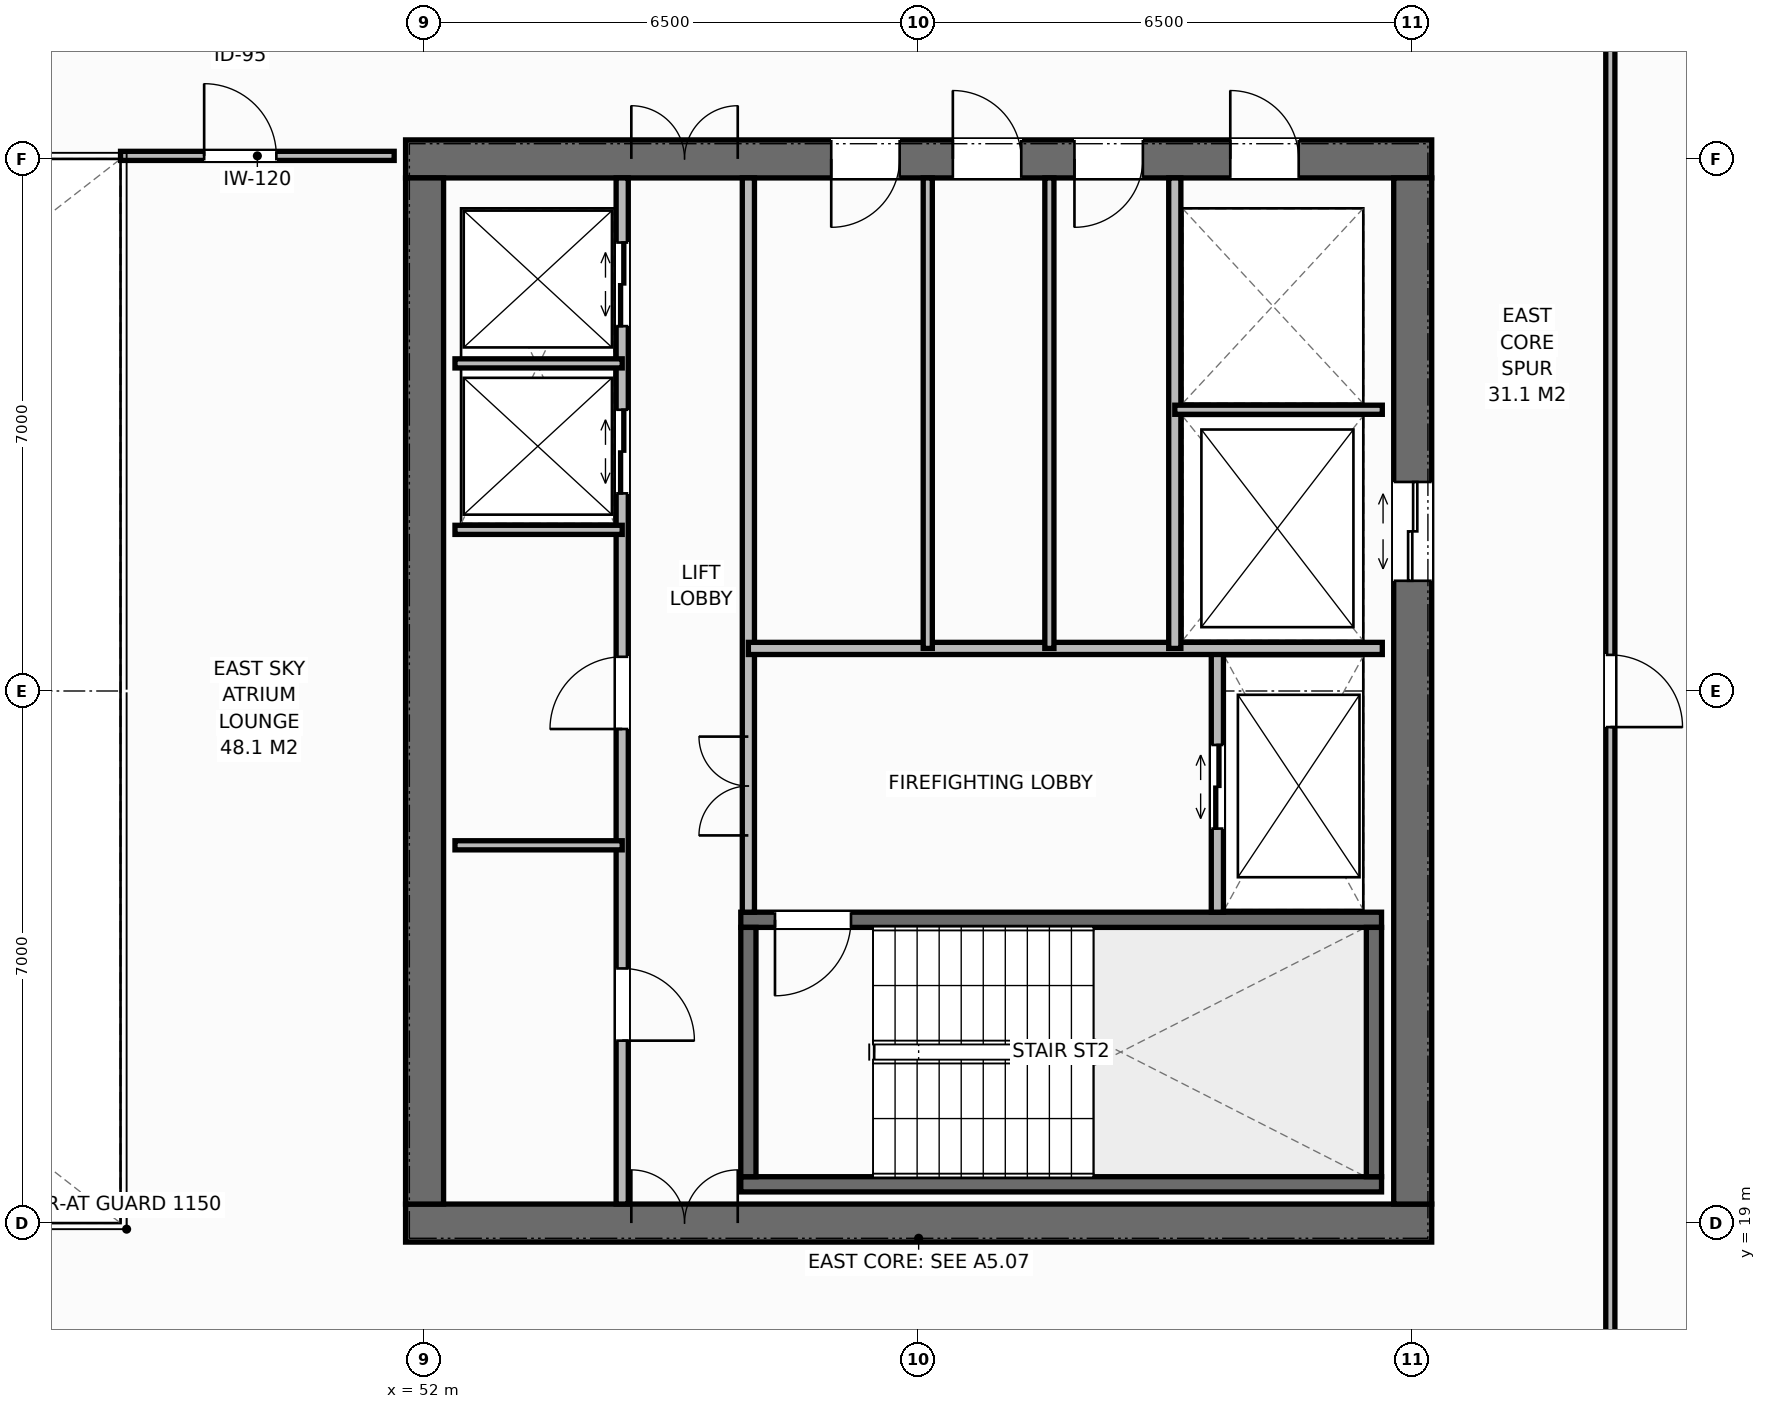
"""IFC4 building model, lengths in metres.
Left out: names, types, materials, properties, quantities, classifications, styles, units other than length and angle.
Written with IfcOpenShell. Run it as: python <this file> out.ifc"""

import sys

from ifc_helpers import new_model, si_unit, direction, frame, frame_2d, origin, place, context, subcontext, project, spatial, rectangle, extrude, element, fill, save


model = new_model("IFC4")
c1 = context("Model", 3, precision=1e-05, world=origin(), true_north=direction((0.0, 1.0)))
c2 = subcontext(c1, "Body", "Model", "MODEL_VIEW")
j1 = project(units=[si_unit("LENGTHUNIT", "METRE"), si_unit("PLANEANGLEUNIT", "RADIAN")], contexts=[c1])
p1 = place(None, origin())
s1 = spatial("IfcSite", under=j1, at=p1, CompositionType="ELEMENT")
p2 = place(p1, origin())
s2 = spatial("IfcBuilding", under=s1, at=p2, CompositionType="ELEMENT")
p3 = place(p2, frame((0.0, 0.0, 251.8)))
s3 = spatial("IfcBuildingStorey", under=s2, at=p3, CompositionType="ELEMENT", Elevation=251.8)
p4 = place(p3, frame((51.75, 19.0, 0.0), z_axis=(0.0, 0.0, 1.0), x_axis=(1.0, 0.0, 0.0)))
e1 = element("IfcWall", 1, at=p4, inside=s3, PredefinedType="SHEAR", context=c2, shape_type="SweptSolid", body=[
    extrude(rectangle(XDim=13.5, YDim=0.5, at=frame_2d((6.75, 0.0))), origin(), (0.0, 0.0, 1.0), 3.8),
])
p5 = place(p4, frame((2.97, 0.0, 0.0)))
e2 = element("IfcOpeningElement", 2, at=p5, cuts=e1, PredefinedType="OPENING", context=c2, shape_type="SweptSolid", body=[
    extrude(rectangle(XDim=1.4, YDim=2.2, at=frame_2d((0.7, 1.1))), frame((0.0, 0.26, 0.0), z_axis=(0.0, -1.0, 0.0), x_axis=(1.0, 0.0, 0.0)), (0.0, 0.0, 1.0), 0.52),
])
p6 = place(p3, frame((51.75, 33.0, 0.0), z_axis=(0.0, 0.0, 1.0), x_axis=(1.0, 0.0, 0.0)))
e3 = element("IfcWall", 3, at=p6, inside=s3, PredefinedType="SHEAR", context=c2, shape_type="SweptSolid", body=[
    extrude(rectangle(XDim=13.5, YDim=0.5, at=frame_2d((6.75, 0.0))), origin(), (0.0, 0.0, 1.0), 3.8),
])
p7 = place(p6, frame((2.97, 0.0, 0.0)))
e4 = element("IfcOpeningElement", 4, at=p7, cuts=e3, PredefinedType="OPENING", context=c2, shape_type="SweptSolid", body=[
    extrude(rectangle(XDim=1.4, YDim=2.2, at=frame_2d((0.7, 1.1))), frame((0.0, 0.26, 0.0), z_axis=(0.0, -1.0, 0.0), x_axis=(1.0, 0.0, 0.0)), (0.0, 0.0, 1.0), 0.52),
])
p8 = place(p6, frame((10.85, 0.0, 0.0)))
e5 = element("IfcOpeningElement", 5, at=p8, cuts=e3, PredefinedType="OPENING", context=c2, shape_type="SweptSolid", body=[
    extrude(rectangle(XDim=0.9, YDim=2.15, at=frame_2d((0.45, 1.075))), frame((0.0, 0.26, 0.0), z_axis=(0.0, -1.0, 0.0), x_axis=(1.0, 0.0, 0.0)), (0.0, 0.0, 1.0), 0.52),
])
p9 = place(p6, frame((5.6, 0.0, 0.0)))
e6 = element("IfcOpeningElement", 6, at=p9, cuts=e3, PredefinedType="OPENING", context=c2, shape_type="SweptSolid", body=[
    extrude(rectangle(XDim=0.9, YDim=2.15, at=frame_2d((0.45, 1.075))), frame((0.0, 0.26, 0.0), z_axis=(0.0, -1.0, 0.0), x_axis=(1.0, 0.0, 0.0)), (0.0, 0.0, 1.0), 0.52),
])
p10 = place(p6, frame((7.2, 0.0, 0.0)))
e7 = element("IfcOpeningElement", 7, at=p10, cuts=e3, PredefinedType="OPENING", context=c2, shape_type="SweptSolid", body=[
    extrude(rectangle(XDim=0.9, YDim=2.15, at=frame_2d((0.45, 1.075))), frame((0.0, 0.26, 0.0), z_axis=(0.0, -1.0, 0.0), x_axis=(1.0, 0.0, 0.0)), (0.0, 0.0, 1.0), 0.52),
])
p11 = place(p6, frame((8.8, 0.0, 0.0)))
e8 = element("IfcOpeningElement", 8, at=p11, cuts=e3, PredefinedType="OPENING", context=c2, shape_type="SweptSolid", body=[
    extrude(rectangle(XDim=0.9, YDim=2.15, at=frame_2d((0.45, 1.075))), frame((0.0, 0.26, 0.0), z_axis=(0.0, -1.0, 0.0), x_axis=(1.0, 0.0, 0.0)), (0.0, 0.0, 1.0), 0.52),
])
p12 = place(p3, frame((52.0, 19.25, 0.0), z_axis=(0.0, 0.0, 1.0), x_axis=(0.0, 1.0, 0.0)))
e9 = element("IfcWall", 9, at=p12, inside=s3, PredefinedType="SHEAR", context=c2, shape_type="SweptSolid", body=[
    extrude(rectangle(XDim=13.5, YDim=0.5, at=frame_2d((6.75, 0.0))), origin(), (0.0, 0.0, 1.0), 3.8),
])
p13 = place(p3, frame((65.0, 19.25, 0.0), z_axis=(0.0, 0.0, 1.0), x_axis=(0.0, 1.0, 0.0)))
e10 = element("IfcWall", 10, at=p13, inside=s3, PredefinedType="SHEAR", context=c2, shape_type="SweptSolid", body=[
    extrude(rectangle(XDim=13.5, YDim=0.5, at=frame_2d((6.75, 0.0))), origin(), (0.0, 0.0, 1.0), 3.8),
])
p14 = place(p13, frame((8.2, 0.0, 0.0)))
e11 = element("IfcOpeningElement", 11, at=p14, cuts=e10, PredefinedType="OPENING", context=c2, shape_type="SweptSolid", body=[
    extrude(rectangle(XDim=1.3, YDim=2.2, at=frame_2d((0.65, 1.1))), frame((0.0, 0.26, 0.0), z_axis=(0.0, -1.0, 0.0), x_axis=(1.0, 0.0, 0.0)), (0.0, 0.0, 1.0), 0.52),
])
p15 = place(p3, frame((56.16, 19.51, 0.0), z_axis=(0.0, 0.0, 1.0), x_axis=(1.0, 0.0, 0.0)))
e12 = element("IfcWall", 12, at=p15, inside=s3, PredefinedType="SHEAR", context=c2, shape_type="SweptSolid", body=[
    extrude(rectangle(XDim=8.43, YDim=0.2, at=frame_2d((4.215, 0.0))), origin(), (0.0, 0.0, 1.0), 3.8),
])
p16 = place(p3, frame((56.16, 22.99, 0.0), z_axis=(0.0, 0.0, 1.0), x_axis=(1.0, 0.0, 0.0)))
e13 = element("IfcWall", 13, at=p16, inside=s3, PredefinedType="SHEAR", context=c2, shape_type="SweptSolid", body=[
    extrude(rectangle(XDim=8.43, YDim=0.2, at=frame_2d((4.215, 0.0))), origin(), (0.0, 0.0, 1.0), 3.8),
])
p17 = place(p16, frame((0.45, 0.0, 0.0)))
e14 = element("IfcOpeningElement", 14, at=p17, cuts=e13, PredefinedType="OPENING", context=c2, shape_type="SweptSolid", body=[
    extrude(rectangle(XDim=1.0, YDim=2.15, at=frame_2d((0.5, 1.075))), frame((0.0, 0.11, 0.0), z_axis=(0.0, -1.0, 0.0), x_axis=(1.0, 0.0, 0.0)), (0.0, 0.0, 1.0), 0.22),
])
for number, where, z_axis, x_axis in (
    (15, (56.26, 19.61, 0.0), (0.0, 0.0, 1.0), (0.0, 1.0, 0.0)),
    (16, (64.49, 19.61, 0.0), (0.0, 0.0, 1.0), (0.0, 1.0, 0.0)),
):
    element("IfcWall", number, at=place(p3, frame(where, z_axis=z_axis, x_axis=x_axis)), inside=s3, PredefinedType="SHEAR", context=c2, shape_type="SweptSolid", body=[
        extrude(rectangle(XDim=3.28, YDim=0.2, at=frame_2d((1.64, 0.0))), origin(), (0.0, 0.0, 1.0), 3.8),
    ])
p18 = place(p3, frame((54.6, 19.25, 0.0), z_axis=(0.0, 0.0, 1.0), x_axis=(0.0, 1.0, 0.0)))
e17 = element("IfcWall", 17, at=p18, inside=s3, PredefinedType="STANDARD", context=c2, shape_type="SweptSolid", body=[
    extrude(rectangle(XDim=13.5, YDim=0.16, at=frame_2d((6.75, 0.0))), origin(), (0.0, 0.0, 1.0), 3.588),
])
p19 = place(p18, frame((2.15, 0.0, 0.0)))
e18 = element("IfcOpeningElement", 18, at=p19, cuts=e17, PredefinedType="OPENING", context=c2, shape_type="SweptSolid", body=[
    extrude(rectangle(XDim=0.95, YDim=2.15, at=frame_2d((0.475, 1.075))), frame((0.0, 0.09, 0.0), z_axis=(0.0, -1.0, 0.0), x_axis=(1.0, 0.0, 0.0)), (0.0, 0.0, 1.0), 0.18),
])
p20 = place(p18, frame((6.25, 0.0, 0.0)))
e19 = element("IfcOpeningElement", 19, at=p20, cuts=e17, PredefinedType="OPENING", context=c2, shape_type="SweptSolid", body=[
    extrude(rectangle(XDim=0.95, YDim=2.15, at=frame_2d((0.475, 1.075))), frame((0.0, 0.09, 0.0), z_axis=(0.0, -1.0, 0.0), x_axis=(1.0, 0.0, 0.0)), (0.0, 0.0, 1.0), 0.18),
])
p21 = place(p18, frame((9.35, 0.0, 0.0)))
e20 = element("IfcOpeningElement", 20, at=p21, cuts=e17, PredefinedType="OPENING", context=c2, shape_type="SweptSolid", body=[
    extrude(rectangle(XDim=1.1, YDim=2.2, at=frame_2d((0.55, 1.1))), frame((0.0, 0.09, 0.0), z_axis=(0.0, -1.0, 0.0), x_axis=(1.0, 0.0, 0.0)), (0.0, 0.0, 1.0), 0.18),
])
p22 = place(p18, frame((11.55, 0.0, 0.0)))
e21 = element("IfcOpeningElement", 21, at=p22, cuts=e17, PredefinedType="OPENING", context=c2, shape_type="SweptSolid", body=[
    extrude(rectangle(XDim=1.1, YDim=2.2, at=frame_2d((0.55, 1.1))), frame((0.0, 0.09, 0.0), z_axis=(0.0, -1.0, 0.0), x_axis=(1.0, 0.0, 0.0)), (0.0, 0.0, 1.0), 0.18),
])
p23 = place(p3, frame((56.26, 23.09, 0.0), z_axis=(0.0, 0.0, 1.0), x_axis=(0.0, 1.0, 0.0)))
e22 = element("IfcWall", 22, at=p23, inside=s3, PredefinedType="STANDARD", context=c2, shape_type="SweptSolid", body=[
    extrude(rectangle(XDim=9.66, YDim=0.16, at=frame_2d((4.83, 0.0))), origin(), (0.0, 0.0, 1.0), 3.588),
])
p24 = place(p23, frame((1.01, 0.0, 0.0)))
e23 = element("IfcOpeningElement", 23, at=p24, cuts=e22, PredefinedType="OPENING", context=c2, shape_type="SweptSolid", body=[
    extrude(rectangle(XDim=1.3, YDim=2.2, at=frame_2d((0.65, 1.1))), frame((0.0, 0.09, 0.0), z_axis=(0.0, -1.0, 0.0), x_axis=(1.0, 0.0, 0.0)), (0.0, 0.0, 1.0), 0.18),
])
for number, where, z_axis, x_axis in (
    (24, (52.4, 23.97, 0.0), (0.0, 0.0, 1.0), (1.0, 0.0, 0.0)),
    (25, (52.4, 28.12, 0.0), (0.0, 0.0, 1.0), (1.0, 0.0, 0.0)),
    (26, (52.4, 30.31, 0.0), (0.0, 0.0, 1.0), (1.0, 0.0, 0.0)),
):
    element("IfcWall", number, at=place(p3, frame(where, z_axis=z_axis, x_axis=x_axis)), inside=s3, PredefinedType="PARTITIONING", context=c2, shape_type="SweptSolid", body=[
        extrude(rectangle(XDim=2.2, YDim=0.12, at=frame_2d((1.1, 0.0))), origin(), (0.0, 0.0, 1.0), 3.588),
    ])
p25 = place(p3, frame((62.43, 23.09, 0.0), z_axis=(0.0, 0.0, 1.0), x_axis=(0.0, 1.0, 0.0)))
e27 = element("IfcWall", 27, at=p25, inside=s3, PredefinedType="STANDARD", context=c2, shape_type="SweptSolid", body=[
    extrude(rectangle(XDim=3.47, YDim=0.16, at=frame_2d((1.735, 0.0))), origin(), (0.0, 0.0, 1.0), 3.588),
])
p26 = place(p25, frame((1.1, 0.0, 0.0)))
e28 = element("IfcOpeningElement", 28, at=p26, cuts=e27, PredefinedType="OPENING", context=c2, shape_type="SweptSolid", body=[
    extrude(rectangle(XDim=1.1, YDim=2.2, at=frame_2d((0.55, 1.1))), frame((0.0, 0.09, 0.0), z_axis=(0.0, -1.0, 0.0), x_axis=(1.0, 0.0, 0.0)), (0.0, 0.0, 1.0), 0.18),
])
p27 = place(p3, frame((56.26, 26.56, 0.0), z_axis=(0.0, 0.0, 1.0), x_axis=(1.0, 0.0, 0.0)))
e29 = element("IfcWall", 29, at=p27, inside=s3, PredefinedType="STANDARD", context=c2, shape_type="SweptSolid", body=[
    extrude(rectangle(XDim=8.34, YDim=0.16, at=frame_2d((4.17, 0.0))), origin(), (0.0, 0.0, 1.0), 3.588),
])
p28 = place(p3, frame((61.87, 26.56, 0.0), z_axis=(0.0, 0.0, 1.0), x_axis=(0.0, 1.0, 0.0)))
e30 = element("IfcWall", 30, at=p28, inside=s3, PredefinedType="STANDARD", context=c2, shape_type="SweptSolid", body=[
    extrude(rectangle(XDim=6.19, YDim=0.16, at=frame_2d((3.095, 0.0))), origin(), (0.0, 0.0, 1.0), 3.588),
])
p29 = place(p3, frame((61.87, 29.7, 0.0), z_axis=(0.0, 0.0, 1.0), x_axis=(1.0, 0.0, 0.0)))
e31 = element("IfcWall", 31, at=p29, inside=s3, PredefinedType="PARTITIONING", context=c2, shape_type="SweptSolid", body=[
    extrude(rectangle(XDim=2.73, YDim=0.12, at=frame_2d((1.365, 0.0))), origin(), (0.0, 0.0, 1.0), 3.588),
])
for number, where, z_axis, x_axis in (
    (32, (58.62, 26.56, 0.0), (0.0, 0.0, 1.0), (0.0, 1.0, 0.0)),
    (33, (60.22, 26.56, 0.0), (0.0, 0.0, 1.0), (0.0, 1.0, 0.0)),
):
    element("IfcWall", number, at=place(p3, frame(where, z_axis=z_axis, x_axis=x_axis)), inside=s3, PredefinedType="PARTITIONING", context=c2, shape_type="SweptSolid", body=[
        extrude(rectangle(XDim=6.19, YDim=0.12, at=frame_2d((3.095, 0.0))), origin(), (0.0, 0.0, 1.0), 3.588),
    ])
p30 = place(p3, frame((48.0, 33.04, 0.0), z_axis=(0.0, 0.0, 1.0), x_axis=(1.0, 0.0, 0.0)))
e34 = element("IfcWall", 34, at=p30, inside=s3, PredefinedType="PARTITIONING", context=c2, shape_type="SweptSolid", body=[
    extrude(rectangle(XDim=3.6, YDim=0.12, at=frame_2d((1.8, 0.0))), origin(), (0.0, 0.0, 1.0), 3.328),
])
p31 = place(p30, frame((1.1, 0.0, 0.0)))
e35 = element("IfcOpeningElement", 35, at=p31, cuts=e34, PredefinedType="OPENING", context=c2, shape_type="SweptSolid", body=[
    extrude(rectangle(XDim=0.95, YDim=2.15, at=frame_2d((0.475, 1.075))), frame((0.0, 0.07, 0.0), z_axis=(0.0, -1.0, 0.0), x_axis=(1.0, 0.0, 0.0)), (0.0, 0.0, 1.0), 0.14),
])
p32 = place(p3, frame((67.6, 16.5, 0.0), z_axis=(0.0, 0.0, 1.0), x_axis=(0.0, 1.0, 0.0)))
e36 = element("IfcWall", 36, at=p32, inside=s3, PredefinedType="PARTITIONING", context=c2, shape_type="SweptSolid", body=[
    extrude(rectangle(XDim=19.0, YDim=0.12, at=frame_2d((9.5, 0.0))), origin(), (0.0, 0.0, 1.0), 3.588),
])
p33 = place(p32, frame((9.025, 0.0, 0.0)))
e37 = element("IfcOpeningElement", 37, at=p33, cuts=e36, PredefinedType="OPENING", context=c2, shape_type="SweptSolid", body=[
    extrude(rectangle(XDim=0.95, YDim=2.15, at=frame_2d((0.475, 1.075))), frame((0.0, 0.07, 0.0), z_axis=(0.0, -1.0, 0.0), x_axis=(1.0, 0.0, 0.0)), (0.0, 0.0, 1.0), 0.14),
])
p34 = place(p5, origin())
e38 = element("IfcDoor", 38, at=p34, inside=s3, OperationType="DOUBLE_DOOR_SINGLE_SWING", PredefinedType="DOOR", context=c2, shape_type="SweptSolid", body=[
    extrude(rectangle(XDim=1.4, YDim=2.2, at=frame_2d((0.7, 1.1))), frame((0.0, 0.075, 0.0), z_axis=(0.0, -1.0, 0.0), x_axis=(1.0, 0.0, 0.0)), (0.0, 0.0, 1.0), 0.05),
])
fill(e2, e38)
p35 = place(p7, origin())
e39 = element("IfcDoor", 39, at=p35, inside=s3, OperationType="DOUBLE_DOOR_SINGLE_SWING", PredefinedType="DOOR", context=c2, shape_type="SweptSolid", body=[
    extrude(rectangle(XDim=1.4, YDim=2.2, at=frame_2d((0.7, 1.1))), frame((0.0, -0.025, 0.0), z_axis=(0.0, -1.0, 0.0), x_axis=(1.0, 0.0, 0.0)), (0.0, 0.0, 1.0), 0.05),
])
fill(e4, e39)
p36 = place(p19, origin())
e40 = element("IfcDoor", 40, at=p36, inside=s3, OperationType="SINGLE_SWING_RIGHT", PredefinedType="DOOR", context=c2, shape_type="SweptSolid", body=[
    extrude(rectangle(XDim=0.95, YDim=2.15, at=frame_2d((0.475, 1.075))), frame((0.0, 0.025, 0.0), z_axis=(0.0, -1.0, 0.0), x_axis=(1.0, 0.0, 0.0)), (0.0, 0.0, 1.0), 0.05),
])
fill(e18, e40)
p37 = place(p20, origin())
e41 = element("IfcDoor", 41, at=p37, inside=s3, OperationType="SINGLE_SWING_LEFT", PredefinedType="DOOR", context=c2, shape_type="SweptSolid", body=[
    extrude(rectangle(XDim=0.95, YDim=2.15, at=frame_2d((0.475, 1.075))), frame((0.0, 0.025, 0.0), z_axis=(0.0, -1.0, 0.0), x_axis=(1.0, 0.0, 0.0)), (0.0, 0.0, 1.0), 0.05),
])
fill(e19, e41)
p38 = place(p21, origin())
e42 = element("IfcDoor", 42, at=p38, inside=s3, OperationType="DOUBLE_DOOR_SLIDING", PredefinedType="DOOR", context=c2, shape_type="SweptSolid", body=[
    extrude(rectangle(XDim=1.1, YDim=2.2, at=frame_2d((0.55, 1.1))), frame((0.0, 0.025, 0.0), z_axis=(0.0, -1.0, 0.0), x_axis=(1.0, 0.0, 0.0)), (0.0, 0.0, 1.0), 0.05),
])
fill(e20, e42)
p39 = place(p22, origin())
e43 = element("IfcDoor", 43, at=p39, inside=s3, OperationType="DOUBLE_DOOR_SLIDING", PredefinedType="DOOR", context=c2, shape_type="SweptSolid", body=[
    extrude(rectangle(XDim=1.1, YDim=2.2, at=frame_2d((0.55, 1.1))), frame((0.0, 0.025, 0.0), z_axis=(0.0, -1.0, 0.0), x_axis=(1.0, 0.0, 0.0)), (0.0, 0.0, 1.0), 0.05),
])
fill(e21, e43)
p40 = place(p17, origin())
e44 = element("IfcDoor", 44, at=p40, inside=s3, OperationType="SINGLE_SWING_RIGHT", PredefinedType="DOOR", context=c2, shape_type="SweptSolid", body=[
    extrude(rectangle(XDim=1.0, YDim=2.15, at=frame_2d((0.5, 1.075))), frame((0.0, 0.025, 0.0), z_axis=(0.0, -1.0, 0.0), x_axis=(1.0, 0.0, 0.0)), (0.0, 0.0, 1.0), 0.05),
])
fill(e14, e44)
p41 = place(p26, origin())
e45 = element("IfcDoor", 45, at=p41, inside=s3, OperationType="DOUBLE_DOOR_SLIDING", PredefinedType="DOOR", context=c2, shape_type="SweptSolid", body=[
    extrude(rectangle(XDim=1.1, YDim=2.2, at=frame_2d((0.55, 1.1))), frame((0.0, 0.025, 0.0), z_axis=(0.0, -1.0, 0.0), x_axis=(1.0, 0.0, 0.0)), (0.0, 0.0, 1.0), 0.05),
])
fill(e28, e45)
p42 = place(p24, origin())
e46 = element("IfcDoor", 46, at=p42, inside=s3, OperationType="DOUBLE_DOOR_SINGLE_SWING", PredefinedType="DOOR", context=c2, shape_type="SweptSolid", body=[
    extrude(rectangle(XDim=1.3, YDim=2.2, at=frame_2d((0.65, 1.1))), frame((0.0, 0.025, 0.0), z_axis=(0.0, -1.0, 0.0), x_axis=(1.0, 0.0, 0.0)), (0.0, 0.0, 1.0), 0.05),
])
fill(e23, e46)
p43 = place(p14, origin())
e47 = element("IfcDoor", 47, at=p43, inside=s3, OperationType="DOUBLE_DOOR_SLIDING", PredefinedType="DOOR", context=c2, shape_type="SweptSolid", body=[
    extrude(rectangle(XDim=1.3, YDim=2.2, at=frame_2d((0.65, 1.1))), frame((0.0, 0.025, 0.0), z_axis=(0.0, -1.0, 0.0), x_axis=(1.0, 0.0, 0.0)), (0.0, 0.0, 1.0), 0.05),
])
fill(e11, e47)
p44 = place(p8, origin())
e48 = element("IfcDoor", 48, at=p44, inside=s3, OperationType="SINGLE_SWING_LEFT", PredefinedType="DOOR", context=c2, shape_type="SweptSolid", body=[
    extrude(rectangle(XDim=0.9, YDim=2.15, at=frame_2d((0.45, 1.075))), frame((0.0, -0.025, 0.0), z_axis=(0.0, -1.0, 0.0), x_axis=(1.0, 0.0, 0.0)), (0.0, 0.0, 1.0), 0.05),
])
fill(e5, e48)
p45 = place(p9, origin())
e49 = element("IfcDoor", 49, at=p45, inside=s3, OperationType="SINGLE_SWING_RIGHT", PredefinedType="DOOR", context=c2, shape_type="SweptSolid", body=[
    extrude(rectangle(XDim=0.9, YDim=2.15, at=frame_2d((0.45, 1.075))), frame((0.0, -0.025, 0.0), z_axis=(0.0, -1.0, 0.0), x_axis=(1.0, 0.0, 0.0)), (0.0, 0.0, 1.0), 0.05),
])
fill(e6, e49)
p46 = place(p10, origin())
e50 = element("IfcDoor", 50, at=p46, inside=s3, OperationType="SINGLE_SWING_LEFT", PredefinedType="DOOR", context=c2, shape_type="SweptSolid", body=[
    extrude(rectangle(XDim=0.9, YDim=2.15, at=frame_2d((0.45, 1.075))), frame((0.0, -0.025, 0.0), z_axis=(0.0, -1.0, 0.0), x_axis=(1.0, 0.0, 0.0)), (0.0, 0.0, 1.0), 0.05),
])
fill(e7, e50)
p47 = place(p11, origin())
e51 = element("IfcDoor", 51, at=p47, inside=s3, OperationType="SINGLE_SWING_RIGHT", PredefinedType="DOOR", context=c2, shape_type="SweptSolid", body=[
    extrude(rectangle(XDim=0.9, YDim=2.15, at=frame_2d((0.45, 1.075))), frame((0.0, -0.025, 0.0), z_axis=(0.0, -1.0, 0.0), x_axis=(1.0, 0.0, 0.0)), (0.0, 0.0, 1.0), 0.05),
])
fill(e8, e51)
p48 = place(p31, origin())
e52 = element("IfcDoor", 52, at=p48, inside=s3, OperationType="SINGLE_SWING_LEFT", PredefinedType="DOOR", context=c2, shape_type="SweptSolid", body=[
    extrude(rectangle(XDim=0.95, YDim=2.15, at=frame_2d((0.475, 1.075))), frame((0.0, 0.025, 0.0), z_axis=(0.0, -1.0, 0.0), x_axis=(1.0, 0.0, 0.0)), (0.0, 0.0, 1.0), 0.05),
])
fill(e35, e52)
p49 = place(p33, origin())
e53 = element("IfcDoor", 53, at=p49, inside=s3, OperationType="SINGLE_SWING_RIGHT", PredefinedType="DOOR", context=c2, shape_type="SweptSolid", body=[
    extrude(rectangle(XDim=0.95, YDim=2.15, at=frame_2d((0.475, 1.075))), frame((0.0, 0.025, 0.0), z_axis=(0.0, -1.0, 0.0), x_axis=(1.0, 0.0, 0.0)), (0.0, 0.0, 1.0), 0.05),
])
fill(e37, e53)
save(model, sys.argv[1])
